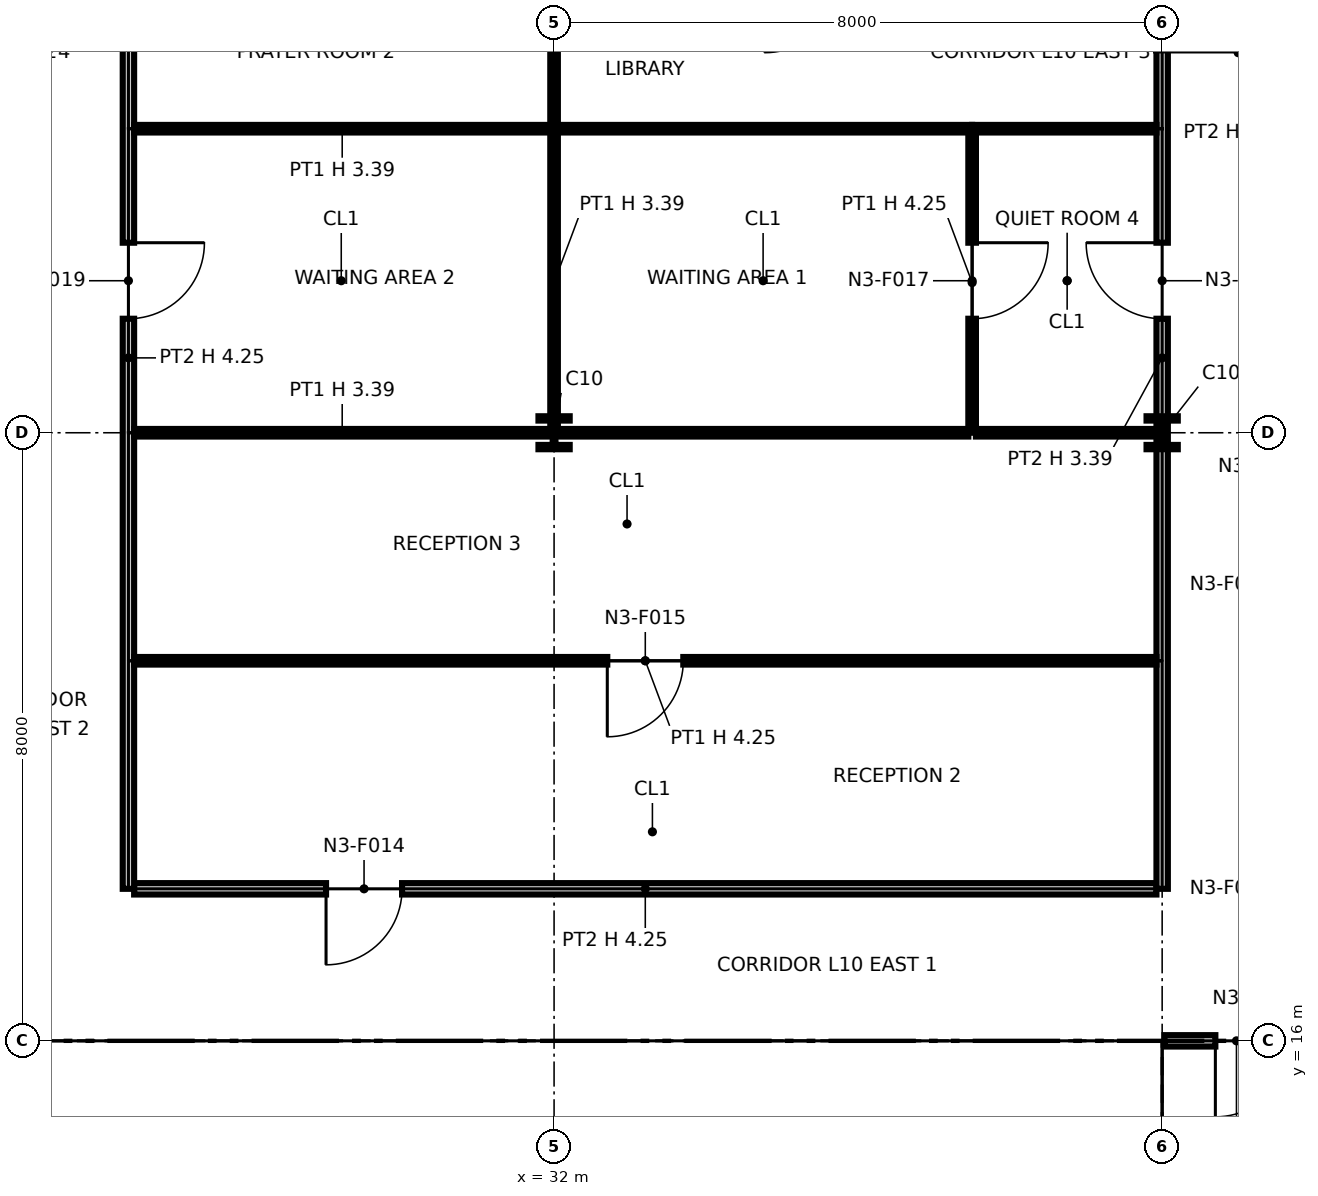
"""IFC4 building model, lengths in metres.
Left out: names, types, materials, properties, quantities, classifications, styles, units other than length and angle.
Written with IfcOpenShell. Run it as: python <this file> out.ifc"""

import sys

from ifc_helpers import new_model, si_unit, direction, frame, frame_2d, origin, origin_2d, place, context, subcontext, project, spatial, polyline, rectangle, i_section, outline, extrude, element, fill, save


model = new_model("IFC4")
c1 = context("Model", 3, precision=1e-05, world=origin(), true_north=direction((0.0, 1.0)))
c2 = subcontext(c1, "Body", "Model", "MODEL_VIEW")
j1 = project(units=[si_unit("LENGTHUNIT", "METRE"), si_unit("PLANEANGLEUNIT", "RADIAN")], contexts=[c1])
p1 = place(None, origin())
s1 = spatial("IfcSite", under=j1, at=p1, CompositionType="ELEMENT")
p2 = place(p1, origin())
s2 = spatial("IfcBuilding", under=s1, at=p2, CompositionType="ELEMENT")
p3 = place(p2, frame((0.0, 0.0, 61.2)))
s3 = spatial("IfcBuildingStorey", under=s2, at=p3, CompositionType="ELEMENT", Elevation=61.2)
p4 = place(p3, frame((32.0, 16.0, 0.0), z_axis=(0.0, 0.0, 1.0), x_axis=(1.0, 0.0, 0.0)))
e1 = element("IfcColumn", 1, at=p4, inside=s3, PredefinedType="COLUMN", context=c2, shape_type="SweptSolid", body=[
    extrude(i_section(OverallWidth=0.406, OverallDepth=0.417, WebThickness=0.03, FlangeThickness=0.048, at=origin_2d()), origin(), (0.0, 0.0, 1.0), 4.25),
])
p5 = place(p3, frame((32.0, 24.0, 0.0), z_axis=(0.0, 0.0, 1.0), x_axis=(1.0, 0.0, 0.0)))
e2 = element("IfcColumn", 2, at=p5, inside=s3, PredefinedType="COLUMN", context=c2, shape_type="SweptSolid", body=[
    extrude(i_section(OverallWidth=0.411, OverallDepth=0.434, WebThickness=0.036, FlangeThickness=0.057, at=origin_2d()), origin(), (0.0, 0.0, 1.0), 4.25),
])
p6 = place(p3, frame((40.0, 16.0, 0.0), z_axis=(0.0, 0.0, 1.0), x_axis=(1.0, 0.0, 0.0)))
e3 = element("IfcColumn", 3, at=p6, inside=s3, PredefinedType="COLUMN", context=c2, shape_type="SweptSolid", body=[
    extrude(i_section(OverallWidth=0.406, OverallDepth=0.417, WebThickness=0.03, FlangeThickness=0.048, at=origin_2d()), origin(), (0.0, 0.0, 1.0), 4.25),
])
p7 = place(p3, frame((40.0, 24.0, 0.0), z_axis=(0.0, 0.0, 1.0), x_axis=(1.0, 0.0, 0.0)))
e4 = element("IfcColumn", 4, at=p7, inside=s3, PredefinedType="COLUMN", context=c2, shape_type="SweptSolid", body=[
    extrude(i_section(OverallWidth=0.411, OverallDepth=0.434, WebThickness=0.036, FlangeThickness=0.057, at=origin_2d()), origin(), (0.0, 0.0, 1.0), 4.25),
])
p8 = place(p3, frame((24.65, 15.25, 0.0), z_axis=(0.0, 0.0, 1.0), x_axis=(1.0, 0.0, 0.0)))
e5 = element("IfcWall", 5, at=p8, inside=s3, PredefinedType="PARTITIONING", context=c2, shape_type="SweptSolid", body=[
    extrude(outline(polyline([(0.0, 0.0), (14.7, 0.0), (14.7, 4.25), (7.469, 4.25), (7.469, 3.632), (7.231, 3.632), (7.23, 4.25), (0.0, 4.25), (0.0, 0.0)])), frame((0.0, 0.1, 0.0), z_axis=(0.0, -1.0, 0.0), x_axis=(1.0, 0.0, 0.0)), (0.0, 0.0, 1.0), 0.2),
])
p9 = place(p8, frame((2.85, 0.0, 0.0)))
e6 = element("IfcOpeningElement", 6, at=p9, cuts=e5, PredefinedType="OPENING", context=c2, shape_type="SweptSolid", body=[
    extrude(rectangle(XDim=1.8, YDim=2.1, at=frame_2d((0.9, 1.05))), frame((0.0, 0.11, 0.0), z_axis=(0.0, -1.0, 0.0), x_axis=(1.0, 0.0, 0.0)), (0.0, 0.0, 1.0), 0.22),
])
p10 = place(p8, frame((9.95, 0.0, 0.0), z_axis=(0.0, 0.0, 1.0), x_axis=(-1.0, 0.0, 0.0)))
e7 = element("IfcOpeningElement", 7, at=p10, cuts=e5, PredefinedType="OPENING", context=c2, shape_type="SweptSolid", body=[
    extrude(rectangle(XDim=1.4, YDim=2.1, at=frame_2d((0.7, 1.05))), frame((0.0, 0.11, 0.0), z_axis=(0.0, -1.0, 0.0), x_axis=(1.0, 0.0, 0.0)), (0.0, 0.0, 1.0), 0.22),
])
p11 = place(p8, frame((13.4, 0.0, 0.0), z_axis=(0.0, 0.0, 1.0), x_axis=(-1.0, 0.0, 0.0)))
e8 = element("IfcOpeningElement", 8, at=p11, cuts=e5, PredefinedType="OPENING", context=c2, shape_type="SweptSolid", body=[
    extrude(rectangle(XDim=1.4, YDim=2.1, at=frame_2d((0.7, 1.05))), frame((0.0, 0.11, 0.0), z_axis=(0.0, -1.0, 0.0), x_axis=(1.0, 0.0, 0.0)), (0.0, 0.0, 1.0), 0.22),
])
p12 = place(p3, frame((32.0, 13.2, 0.0), z_axis=(0.0, 0.0, 1.0), x_axis=(0.0, 1.0, 0.0)))
e9 = element("IfcWall", 9, at=p12, inside=s3, PredefinedType="PARTITIONING", context=c2, shape_type="SweptSolid", body=[
    extrude(rectangle(XDim=1.95, YDim=0.6, at=frame_2d((0.975, 0.0))), origin(), (0.0, 0.0, 1.0), 3.632),
])
for number, where, z_axis, x_axis in (
    (10, (35.6, 8.85, 0.0), (0.0, 0.0, 1.0), (0.0, 1.0, 0.0)),
    (11, (39.25, 8.85, 0.0), (0.0, 0.0, 1.0), (0.0, 1.0, 0.0)),
):
    element("IfcWall", number, at=place(p3, frame(where, z_axis=z_axis, x_axis=x_axis)), inside=s3, PredefinedType="PARTITIONING", context=c2, shape_type="SweptSolid", body=[
        extrude(rectangle(XDim=6.3, YDim=0.2, at=frame_2d((3.15, 0.0))), origin(), (0.0, 0.0, 1.0), 4.25),
    ])
p13 = place(p3, frame((40.03, 16.0, 0.0), z_axis=(0.0, 0.0, 1.0), x_axis=(1.0, 0.0, 0.0)))
e12 = element("IfcWall", 12, at=p13, inside=s3, PredefinedType="PARTITIONING", context=c2, shape_type="SweptSolid", body=[
    extrude(rectangle(XDim=1.895, YDim=0.15, at=frame_2d((0.948, 0.0))), origin(), (0.0, 0.0, 1.0), 3.391),
])
p14 = place(p13, frame((1.67, 0.0, 0.0), z_axis=(0.0, 0.0, 1.0), x_axis=(-1.0, 0.0, 0.0)))
e13 = element("IfcOpeningElement", 13, at=p14, cuts=e12, PredefinedType="OPENING", context=c2, shape_type="SweptSolid", body=[
    extrude(rectangle(XDim=1.0, YDim=2.1, at=frame_2d((0.5, 1.05))), frame((0.0, 0.085, 0.0), z_axis=(0.0, -1.0, 0.0), x_axis=(1.0, 0.0, 0.0)), (0.0, 0.0, 1.0), 0.17),
])
p15 = place(p3, frame((26.475, 18.0, 0.0), z_axis=(0.0, 0.0, 1.0), x_axis=(1.0, 0.0, 0.0)))
e14 = element("IfcWall", 14, at=p15, inside=s3, PredefinedType="PARTITIONING", context=c2, shape_type="SweptSolid", body=[
    extrude(rectangle(XDim=13.45, YDim=0.15, at=frame_2d((6.725, 0.0))), origin(), (0.0, 0.0, 1.0), 4.25),
])
p16 = place(p15, frame((3.525, 0.0, 0.0), z_axis=(0.0, 0.0, 1.0), x_axis=(-1.0, 0.0, 0.0)))
e15 = element("IfcOpeningElement", 15, at=p16, cuts=e14, PredefinedType="OPENING", context=c2, shape_type="SweptSolid", body=[
    extrude(rectangle(XDim=1.0, YDim=2.1, at=frame_2d((0.5, 1.05))), frame((0.0, 0.085, 0.0), z_axis=(0.0, -1.0, 0.0), x_axis=(1.0, 0.0, 0.0)), (0.0, 0.0, 1.0), 0.17),
])
p17 = place(p3, frame((26.4, 18.0, 0.0), z_axis=(0.0, 0.0, 1.0), x_axis=(0.0, 1.0, 0.0)))
e16 = element("IfcWall", 16, at=p17, inside=s3, PredefinedType="PARTITIONING", context=c2, shape_type="SweptSolid", body=[
    extrude(outline(polyline([(0.0, 0.0), (13.97, 0.0), (13.97, 4.25), (10.3, 4.25), (10.298, 3.391), (9.702, 3.391), (9.7, 4.25), (6.3, 4.25), (6.298, 3.391), (5.702, 3.391), (5.7, 4.25), (2.3, 4.25), (2.298, 3.391), (1.702, 3.391), (1.7, 4.25), (0.0, 4.25), (0.0, 0.0)])), frame((0.0, 0.075, 0.0), z_axis=(0.0, -1.0, 0.0), x_axis=(1.0, 0.0, 0.0)), (0.0, 0.0, 1.0), 0.15),
])
p18 = place(p17, frame((8.5, 0.0, 0.0), z_axis=(0.0, 0.0, 1.0), x_axis=(-1.0, 0.0, 0.0)))
e17 = element("IfcOpeningElement", 17, at=p18, cuts=e16, PredefinedType="OPENING", context=c2, shape_type="SweptSolid", body=[
    extrude(rectangle(XDim=1.0, YDim=2.1, at=frame_2d((0.5, 1.05))), frame((0.0, 0.085, 0.0), z_axis=(0.0, -1.0, 0.0), x_axis=(1.0, 0.0, 0.0)), (0.0, 0.0, 1.0), 0.17),
])
p19 = place(p17, frame((12.5, 0.0, 0.0), z_axis=(0.0, 0.0, 1.0), x_axis=(-1.0, 0.0, 0.0)))
e18 = element("IfcOpeningElement", 18, at=p19, cuts=e16, PredefinedType="OPENING", context=c2, shape_type="SweptSolid", body=[
    extrude(rectangle(XDim=1.0, YDim=2.1, at=frame_2d((0.5, 1.05))), frame((0.0, 0.085, 0.0), z_axis=(0.0, -1.0, 0.0), x_axis=(1.0, 0.0, 0.0)), (0.0, 0.0, 1.0), 0.17),
])
p20 = place(p3, frame((40.0, 18.0, 0.0), z_axis=(0.0, 0.0, 1.0), x_axis=(0.0, 1.0, 0.0)))
e19 = element("IfcWall", 19, at=p20, inside=s3, PredefinedType="PARTITIONING", context=c2, shape_type="SweptSolid", body=[
    extrude(rectangle(XDim=13.97, YDim=0.15, at=frame_2d((6.985, 0.0))), origin(), (0.0, 0.0, 1.0), 3.391),
])
p21 = place(p20, frame((7.5, 0.0, 0.0)))
e20 = element("IfcOpeningElement", 20, at=p21, cuts=e19, PredefinedType="OPENING", context=c2, shape_type="SweptSolid", body=[
    extrude(rectangle(XDim=1.0, YDim=2.1, at=frame_2d((0.5, 1.05))), frame((0.0, 0.085, 0.0), z_axis=(0.0, -1.0, 0.0), x_axis=(1.0, 0.0, 0.0)), (0.0, 0.0, 1.0), 0.17),
])
p22 = place(p3, frame((26.475, 21.0, 0.0), z_axis=(0.0, 0.0, 1.0), x_axis=(1.0, 0.0, 0.0)))
e21 = element("IfcWall", 21, at=p22, inside=s3, PredefinedType="PARTITIONING", context=c2, shape_type="SweptSolid", body=[
    extrude(rectangle(XDim=13.45, YDim=0.1, at=frame_2d((6.725, 0.0))), origin(), (0.0, 0.0, 1.0), 4.25),
])
p23 = place(p22, frame((7.225, 0.0, 0.0), z_axis=(0.0, 0.0, 1.0), x_axis=(-1.0, 0.0, 0.0)))
e22 = element("IfcOpeningElement", 22, at=p23, cuts=e21, PredefinedType="OPENING", context=c2, shape_type="SweptSolid", body=[
    extrude(rectangle(XDim=1.0, YDim=2.1, at=frame_2d((0.5, 1.05))), frame((0.0, 0.06, 0.0), z_axis=(0.0, -1.0, 0.0), x_axis=(1.0, 0.0, 0.0)), (0.0, 0.0, 1.0), 0.12),
])
p24 = place(p3, frame((26.475, 24.0, 0.0), z_axis=(0.0, 0.0, 1.0), x_axis=(1.0, 0.0, 0.0)))
e23 = element("IfcWall", 23, at=p24, inside=s3, PredefinedType="PARTITIONING", context=c2, shape_type="SweptSolid", body=[
    extrude(rectangle(XDim=5.475, YDim=0.1, at=frame_2d((2.737, 0.0))), origin(), (0.0, 0.0, 1.0), 3.391),
])
p25 = place(p3, frame((32.05, 24.0, 0.0), z_axis=(0.0, 0.0, 1.0), x_axis=(1.0, 0.0, 0.0)))
e24 = element("IfcWall", 24, at=p25, inside=s3, PredefinedType="PARTITIONING", context=c2, shape_type="SweptSolid", body=[
    extrude(rectangle(XDim=5.4, YDim=0.1, at=frame_2d((2.7, 0.0))), origin(), (0.0, 0.0, 1.0), 3.391),
])
p26 = place(p3, frame((32.0, 24.0, 0.0), z_axis=(0.0, 0.0, 1.0), x_axis=(0.0, 1.0, 0.0)))
e25 = element("IfcWall", 25, at=p26, inside=s3, PredefinedType="PARTITIONING", context=c2, shape_type="SweptSolid", body=[
    extrude(rectangle(XDim=3.95, YDim=0.1, at=frame_2d((1.975, 0.0))), origin(), (0.0, 0.0, 1.0), 3.391),
])
p27 = place(p3, frame((37.55, 24.0, 0.0), z_axis=(0.0, 0.0, 1.0), x_axis=(1.0, 0.0, 0.0)))
e26 = element("IfcWall", 26, at=p27, inside=s3, PredefinedType="PARTITIONING", context=c2, shape_type="SweptSolid", body=[
    extrude(rectangle(XDim=2.375, YDim=0.1, at=frame_2d((1.188, 0.0))), origin(), (0.0, 0.0, 1.0), 3.391),
])
p28 = place(p3, frame((37.5, 24.0, 0.0), z_axis=(0.0, 0.0, 1.0), x_axis=(0.0, 1.0, 0.0)))
e27 = element("IfcWall", 27, at=p28, inside=s3, PredefinedType="PARTITIONING", context=c2, shape_type="SweptSolid", body=[
    extrude(rectangle(XDim=3.95, YDim=0.1, at=frame_2d((1.975, 0.0))), origin(), (0.0, 0.0, 1.0), 4.25),
])
p29 = place(p28, frame((2.5, 0.0, 0.0), z_axis=(0.0, 0.0, 1.0), x_axis=(-1.0, 0.0, 0.0)))
e28 = element("IfcOpeningElement", 28, at=p29, cuts=e27, PredefinedType="OPENING", context=c2, shape_type="SweptSolid", body=[
    extrude(rectangle(XDim=1.0, YDim=2.1, at=frame_2d((0.5, 1.05))), frame((0.0, 0.06, 0.0), z_axis=(0.0, -1.0, 0.0), x_axis=(1.0, 0.0, 0.0)), (0.0, 0.0, 1.0), 0.12),
])
p30 = place(p3, frame((26.475, 28.0, 0.0), z_axis=(0.0, 0.0, 1.0), x_axis=(1.0, 0.0, 0.0)))
e29 = element("IfcWall", 29, at=p30, inside=s3, PredefinedType="PARTITIONING", context=c2, shape_type="SweptSolid", body=[
    extrude(rectangle(XDim=5.475, YDim=0.1, at=frame_2d((2.737, 0.0))), origin(), (0.0, 0.0, 1.0), 3.391),
])
p31 = place(p3, frame((32.05, 28.0, 0.0), z_axis=(0.0, 0.0, 1.0), x_axis=(1.0, 0.0, 0.0)))
e30 = element("IfcWall", 30, at=p31, inside=s3, PredefinedType="PARTITIONING", context=c2, shape_type="SweptSolid", body=[
    extrude(rectangle(XDim=5.45, YDim=0.1, at=frame_2d((2.725, 0.0))), origin(), (0.0, 0.0, 1.0), 3.391),
])
p32 = place(p3, frame((32.0, 28.0, 0.0), z_axis=(0.0, 0.0, 1.0), x_axis=(0.0, 1.0, 0.0)))
e31 = element("IfcWall", 31, at=p32, inside=s3, PredefinedType="PARTITIONING", context=c2, shape_type="SweptSolid", body=[
    extrude(rectangle(XDim=1.925, YDim=0.1, at=frame_2d((0.962, 0.0))), origin(), (0.0, 0.0, 1.0), 3.391),
])
p33 = place(p3, frame((37.5, 28.0, 0.0), z_axis=(0.0, 0.0, 1.0), x_axis=(1.0, 0.0, 0.0)))
e32 = element("IfcWall", 32, at=p33, inside=s3, PredefinedType="PARTITIONING", context=c2, shape_type="SweptSolid", body=[
    extrude(rectangle(XDim=2.425, YDim=0.1, at=frame_2d((1.212, 0.0))), origin(), (0.0, 0.0, 1.0), 3.391),
])
p34 = place(p9, origin())
e33 = element("IfcDoor", 33, at=p34, inside=s3, OperationType="DOUBLE_DOOR_SINGLE_SWING", PredefinedType="NOTDEFINED", context=c2, shape_type="SweptSolid", body=[
    extrude(rectangle(XDim=1.8, YDim=2.1, at=frame_2d((0.9, 1.05))), frame((0.0, 0.025, 0.0), z_axis=(0.0, -1.0, 0.0), x_axis=(1.0, 0.0, 0.0)), (0.0, 0.0, 1.0), 0.05),
])
fill(e6, e33)
p35 = place(p10, origin())
e34 = element("IfcDoor", 34, at=p35, inside=s3, OperationType="DOUBLE_DOOR_SINGLE_SWING", PredefinedType="NOTDEFINED", context=c2, shape_type="SweptSolid", body=[
    extrude(rectangle(XDim=1.4, YDim=2.1, at=frame_2d((0.7, 1.05))), frame((0.0, 0.025, 0.0), z_axis=(0.0, -1.0, 0.0), x_axis=(1.0, 0.0, 0.0)), (0.0, 0.0, 1.0), 0.05),
])
fill(e7, e34)
p36 = place(p11, origin())
e35 = element("IfcDoor", 35, at=p36, inside=s3, OperationType="DOUBLE_DOOR_SINGLE_SWING", PredefinedType="NOTDEFINED", context=c2, shape_type="SweptSolid", body=[
    extrude(rectangle(XDim=1.4, YDim=2.1, at=frame_2d((0.7, 1.05))), frame((0.0, 0.025, 0.0), z_axis=(0.0, -1.0, 0.0), x_axis=(1.0, 0.0, 0.0)), (0.0, 0.0, 1.0), 0.05),
])
fill(e8, e35)
p37 = place(p14, origin())
e36 = element("IfcDoor", 36, at=p37, inside=s3, OperationType="SINGLE_SWING_RIGHT", PredefinedType="DOOR", context=c2, shape_type="SweptSolid", body=[
    extrude(rectangle(XDim=1.0, YDim=2.1, at=frame_2d((0.5, 1.05))), frame((0.0, 0.025, 0.0), z_axis=(0.0, -1.0, 0.0), x_axis=(1.0, 0.0, 0.0)), (0.0, 0.0, 1.0), 0.05),
])
fill(e13, e36)
p38 = place(p16, origin())
e37 = element("IfcDoor", 37, at=p38, inside=s3, OperationType="SINGLE_SWING_RIGHT", PredefinedType="DOOR", context=c2, shape_type="SweptSolid", body=[
    extrude(rectangle(XDim=1.0, YDim=2.1, at=frame_2d((0.5, 1.05))), frame((0.0, 0.025, 0.0), z_axis=(0.0, -1.0, 0.0), x_axis=(1.0, 0.0, 0.0)), (0.0, 0.0, 1.0), 0.05),
])
fill(e15, e37)
p39 = place(p23, origin())
e38 = element("IfcDoor", 38, at=p39, inside=s3, OperationType="SINGLE_SWING_RIGHT", PredefinedType="DOOR", context=c2, shape_type="SweptSolid", body=[
    extrude(rectangle(XDim=1.0, YDim=2.1, at=frame_2d((0.5, 1.05))), frame((0.0, 0.025, 0.0), z_axis=(0.0, -1.0, 0.0), x_axis=(1.0, 0.0, 0.0)), (0.0, 0.0, 1.0), 0.05),
])
fill(e22, e38)
p40 = place(p21, origin())
e39 = element("IfcDoor", 39, at=p40, inside=s3, OperationType="SINGLE_SWING_RIGHT", PredefinedType="DOOR", context=c2, shape_type="SweptSolid", body=[
    extrude(rectangle(XDim=1.0, YDim=2.1, at=frame_2d((0.5, 1.05))), frame((0.0, 0.025, 0.0), z_axis=(0.0, -1.0, 0.0), x_axis=(1.0, 0.0, 0.0)), (0.0, 0.0, 1.0), 0.05),
])
fill(e20, e39)
p41 = place(p29, origin())
e40 = element("IfcDoor", 40, at=p41, inside=s3, OperationType="SINGLE_SWING_LEFT", PredefinedType="DOOR", context=c2, shape_type="SweptSolid", body=[
    extrude(rectangle(XDim=1.0, YDim=2.1, at=frame_2d((0.5, 1.05))), frame((0.0, 0.025, 0.0), z_axis=(0.0, -1.0, 0.0), x_axis=(1.0, 0.0, 0.0)), (0.0, 0.0, 1.0), 0.05),
])
fill(e28, e40)
p42 = place(p18, origin())
e41 = element("IfcDoor", 41, at=p42, inside=s3, OperationType="SINGLE_SWING_LEFT", PredefinedType="DOOR", context=c2, shape_type="SweptSolid", body=[
    extrude(rectangle(XDim=1.0, YDim=2.1, at=frame_2d((0.5, 1.05))), frame((0.0, 0.025, 0.0), z_axis=(0.0, -1.0, 0.0), x_axis=(1.0, 0.0, 0.0)), (0.0, 0.0, 1.0), 0.05),
])
fill(e17, e41)
save(model, sys.argv[1])
